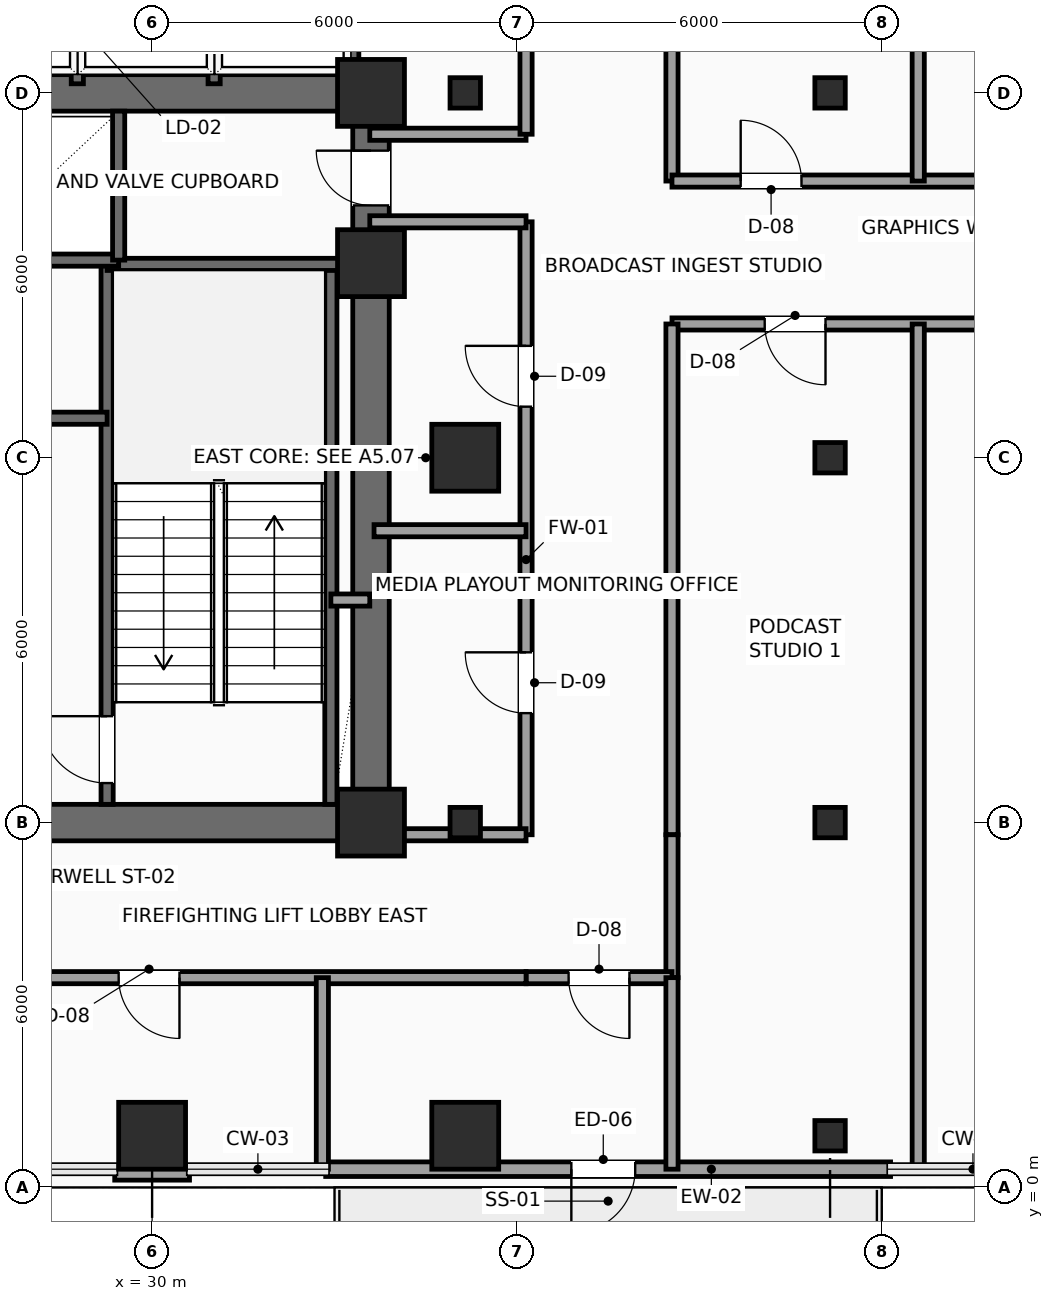
"""IFC4 building model, lengths in metres.
Left out: names, types, materials, properties, quantities, classifications, styles, units other than length and angle.
Written with IfcOpenShell. Run it as: python <this file> out.ifc"""

import sys

from ifc_helpers import new_model, si_unit, direction, frame, frame_2d, origin, origin_2d, place, context, subcontext, project, spatial, rectangle, hollow_rectangle, extrude, element, fill, save


model = new_model("IFC4")
c1 = context("Model", 3, precision=1e-05, world=origin(), true_north=direction((0.0, 1.0)))
c2 = subcontext(c1, "Body", "Model", "MODEL_VIEW")
j1 = project(units=[si_unit("LENGTHUNIT", "METRE"), si_unit("PLANEANGLEUNIT", "RADIAN")], contexts=[c1])
p1 = place(None, origin())
s1 = spatial("IfcSite", under=j1, at=p1, CompositionType="ELEMENT")
p2 = place(p1, origin())
s2 = spatial("IfcBuilding", under=s1, at=p2, CompositionType="ELEMENT")
p3 = place(p2, frame((0.0, 0.0, 119.4)))
s3 = spatial("IfcBuildingStorey", under=s2, at=p3, CompositionType="ELEMENT", Elevation=119.4)
for number, where, z_axis, x_axis in (
    (1, (33.6, 6.0, 0.0), (0.0, 0.0, 1.0), (1.0, 0.0, 0.0)),
    (2, (33.6, 15.2, 0.0), (0.0, 0.0, 1.0), (1.0, 0.0, 0.0)),
    (3, (33.6, 18.0, 0.0), (0.0, 0.0, 1.0), (1.0, 0.0, 0.0)),
    (4, (30.0, 0.85, 0.0), (0.0, 0.0, 1.0), (1.0, 0.0, 0.0)),
    (5, (35.15, 0.85, 0.0), (0.0, 0.0, 1.0), (1.0, 0.0, 0.0)),
):
    element("IfcColumn", number, at=place(p3, frame(where, z_axis=z_axis, x_axis=x_axis)), inside=s3, PredefinedType="COLUMN", context=c2, shape_type="SweptSolid", body=[
        extrude(rectangle(XDim=1.1, YDim=1.1, at=origin_2d()), origin(), (0.0, 0.0, 1.0), 3.75),
    ])
p4 = place(p3, frame((35.15, 6.0, 0.0), z_axis=(0.0, 0.0, 1.0), x_axis=(1.0, 0.0, 0.0)))
e6 = element("IfcColumn", 6, at=p4, inside=s3, PredefinedType="COLUMN", context=c2, shape_type="SweptSolid", body=[
    extrude(hollow_rectangle(XDim=0.5, YDim=0.5, WallThickness=0.025, InnerFilletRadius=0.025, OuterFilletRadius=0.04, at=origin_2d()), origin(), (0.0, 0.0, 1.0), 3.75),
])
p5 = place(p3, frame((35.15, 12.0, 0.0), z_axis=(0.0, 0.0, 1.0), x_axis=(1.0, 0.0, 0.0)))
e7 = element("IfcColumn", 7, at=p5, inside=s3, PredefinedType="COLUMN", context=c2, shape_type="SweptSolid", body=[
    extrude(rectangle(XDim=1.1, YDim=1.1, at=origin_2d()), origin(), (0.0, 0.0, 1.0), 3.75),
])
for number, where, z_axis, x_axis in (
    (8, (35.15, 18.0, 0.0), (0.0, 0.0, 1.0), (1.0, 0.0, 0.0)),
    (9, (41.15, 0.85, 0.0), (0.0, 0.0, 1.0), (1.0, 0.0, 0.0)),
    (10, (41.15, 6.0, 0.0), (0.0, 0.0, 1.0), (1.0, 0.0, 0.0)),
    (11, (41.15, 12.0, 0.0), (0.0, 0.0, 1.0), (1.0, 0.0, 0.0)),
    (12, (41.15, 18.0, 0.0), (0.0, 0.0, 1.0), (1.0, 0.0, 0.0)),
):
    element("IfcColumn", number, at=place(p3, frame(where, z_axis=z_axis, x_axis=x_axis)), inside=s3, PredefinedType="COLUMN", context=c2, shape_type="SweptSolid", body=[
        extrude(hollow_rectangle(XDim=0.5, YDim=0.5, WallThickness=0.025, InnerFilletRadius=0.025, OuterFilletRadius=0.04, at=origin_2d()), origin(), (0.0, 0.0, 1.0), 3.75),
    ])
p6 = place(p3, frame((42.145, 0.3, 0.0), z_axis=(0.0, 0.0, 1.0), x_axis=(-1.0, 0.0, 0.0)))
e13 = element("IfcWall", 13, at=p6, inside=s3, PredefinedType="SOLIDWALL", context=c2, shape_type="SweptSolid", body=[
    extrude(rectangle(XDim=9.29, YDim=0.24, at=frame_2d((4.645, 0.0))), origin(), (0.0, 0.0, 1.0), 3.525),
])
p7 = place(p6, frame((4.2, 0.0, 0.0)))
e14 = element("IfcOpeningElement", 14, at=p7, cuts=e13, PredefinedType="OPENING", context=c2, shape_type="SweptSolid", body=[
    extrude(rectangle(XDim=1.05, YDim=2.2, at=frame_2d((0.525, 1.1))), frame((0.0, 0.13, 0.0), z_axis=(0.0, -1.0, 0.0), x_axis=(1.0, 0.0, 0.0)), (0.0, 0.0, 1.0), 0.26),
])
p8 = place(p3, frame((30.615, 0.24, 0.0), z_axis=(0.0, 0.0, 1.0), x_axis=(-1.0, 0.0, 0.0)))
e15 = element("IfcWall", 15, at=p8, inside=s3, PredefinedType="SOLIDWALL", context=c2, shape_type="SweptSolid", body=[
    extrude(rectangle(XDim=1.23, YDim=0.24, at=frame_2d((0.615, 0.0))), origin(), (0.0, 0.0, 1.0), 3.525),
])
for number, where, z_axis, x_axis in (
    (16, (24.0, 6.0, 0.0), (0.0, 0.0, 1.0), (1.0, 0.0, 0.0)),
    (17, (24.0, 18.0, 0.0), (0.0, 0.0, 1.0), (1.0, 0.0, 0.0)),
):
    element("IfcWall", number, at=place(p3, frame(where, z_axis=z_axis, x_axis=x_axis)), inside=s3, PredefinedType="SHEAR", context=c2, shape_type="SweptSolid", body=[
        extrude(rectangle(XDim=9.6, YDim=0.6, at=frame_2d((4.8, 0.0))), origin(), (0.0, 0.0, 1.0), 3.525),
    ])
p9 = place(p3, frame((33.6, 6.0, 0.0), z_axis=(0.0, 0.0, 1.0), x_axis=(0.0, 1.0, 0.0)))
e18 = element("IfcWall", 18, at=p9, inside=s3, PredefinedType="SHEAR", context=c2, shape_type="SweptSolid", body=[
    extrude(rectangle(XDim=12.0, YDim=0.6, at=frame_2d((6.0, 0.0))), origin(), (0.0, 0.0, 1.0), 3.525),
])
p10 = place(p9, frame((10.15, 0.0, 0.0)))
e19 = element("IfcOpeningElement", 19, at=p10, cuts=e18, PredefinedType="OPENING", context=c2, shape_type="SweptSolid", body=[
    extrude(rectangle(XDim=0.9, YDim=2.15, at=frame_2d((0.45, 1.075))), frame((0.0, 0.31, 0.0), z_axis=(0.0, -1.0, 0.0), x_axis=(1.0, 0.0, 0.0)), (0.0, 0.0, 1.0), 0.62),
])
p11 = place(p3, frame((29.26, 6.3, 0.0), z_axis=(0.0, 0.0, 1.0), x_axis=(0.0, 1.0, 0.0)))
e20 = element("IfcWall", 20, at=p11, inside=s3, PredefinedType="SHEAR", context=c2, shape_type="SweptSolid", body=[
    extrude(rectangle(XDim=8.88, YDim=0.2, at=frame_2d((4.44, 0.0))), origin(), (0.0, 0.0, 1.0), 3.525),
])
p12 = place(p11, frame((0.35, 0.0, 0.0)))
e21 = element("IfcOpeningElement", 21, at=p12, cuts=e20, PredefinedType="OPENING", context=c2, shape_type="SweptSolid", body=[
    extrude(rectangle(XDim=1.1, YDim=2.2, at=frame_2d((0.55, 1.1))), frame((0.0, 0.11, 0.0), z_axis=(0.0, -1.0, 0.0), x_axis=(1.0, 0.0, 0.0)), (0.0, 0.0, 1.0), 0.22),
])
p13 = place(p3, frame((32.94, 6.3, 0.0), z_axis=(0.0, 0.0, 1.0), x_axis=(0.0, 1.0, 0.0)))
e22 = element("IfcWall", 22, at=p13, inside=s3, PredefinedType="SHEAR", context=c2, shape_type="SweptSolid", body=[
    extrude(rectangle(XDim=8.88, YDim=0.2, at=frame_2d((4.44, 0.0))), origin(), (0.0, 0.0, 1.0), 3.525),
])
p14 = place(p3, frame((29.26, 15.18, 0.0), z_axis=(0.0, 0.0, 1.0), x_axis=(1.0, 0.0, 0.0)))
e23 = element("IfcWall", 23, at=p14, inside=s3, PredefinedType="SHEAR", context=c2, shape_type="SweptSolid", body=[
    extrude(rectangle(XDim=4.04, YDim=0.2, at=frame_2d((2.02, 0.0))), origin(), (0.0, 0.0, 1.0), 3.525),
])
p15 = place(p3, frame((26.42, 12.65, 0.0), z_axis=(0.0, 0.0, 1.0), x_axis=(1.0, 0.0, 0.0)))
e24 = element("IfcWall", 24, at=p15, inside=s3, PredefinedType="SHEAR", context=c2, shape_type="SweptSolid", body=[
    extrude(rectangle(XDim=2.84, YDim=0.2, at=frame_2d((1.42, 0.0))), origin(), (0.0, 0.0, 1.0), 3.525),
])
p16 = place(p15, frame((0.9, 0.0, 0.0)))
e25 = element("IfcOpeningElement", 25, at=p16, cuts=e24, PredefinedType="OPENING", context=c2, shape_type="SweptSolid", body=[
    extrude(rectangle(XDim=0.9, YDim=2.15, at=frame_2d((0.45, 1.075))), frame((0.0, 0.11, 0.0), z_axis=(0.0, -1.0, 0.0), x_axis=(1.0, 0.0, 0.0)), (0.0, 0.0, 1.0), 0.22),
])
p17 = place(p3, frame((32.94, 9.66, 0.0), z_axis=(0.0, 0.0, 1.0), x_axis=(1.0, 0.0, 0.0)))
e26 = element("IfcWall", 26, at=p17, inside=s3, PredefinedType="SOLIDWALL", context=c2, shape_type="SweptSolid", body=[
    extrude(rectangle(XDim=0.64, YDim=0.2, at=frame_2d((0.32, 0.0))), origin(), (0.0, 0.0, 1.0), 3.525),
])
p18 = place(p3, frame((24.25, 15.25, 0.0), z_axis=(0.0, 0.0, 1.0), x_axis=(1.0, 0.0, 0.0)))
e27 = element("IfcWall", 27, at=p18, inside=s3, PredefinedType="SHEAR", context=c2, shape_type="SweptSolid", body=[
    extrude(rectangle(XDim=5.2, YDim=0.2, at=frame_2d((2.6, 0.0))), origin(), (0.0, 0.0, 1.0), 3.525),
])
p19 = place(p3, frame((29.45, 15.25, 0.0), z_axis=(0.0, 0.0, 1.0), x_axis=(0.0, 1.0, 0.0)))
e28 = element("IfcWall", 28, at=p19, inside=s3, PredefinedType="SHEAR", context=c2, shape_type="SweptSolid", body=[
    extrude(rectangle(XDim=2.45, YDim=0.2, at=frame_2d((1.225, 0.0))), origin(), (0.0, 0.0, 1.0), 3.525),
])
p20 = place(p3, frame((33.3, 18.1, 0.0), z_axis=(0.0, 0.0, 1.0), x_axis=(0.0, 1.0, 0.0)))
e29 = element("IfcWall", 29, at=p20, inside=s3, PredefinedType="SHEAR", context=c2, shape_type="SweptSolid", body=[
    extrude(rectangle(XDim=2.35, YDim=0.2, at=frame_2d((1.175, 0.0))), origin(), (0.0, 0.0, 1.0), 3.525),
])
for number, where, z_axis, x_axis in (
    (30, (28.77, 18.15, 0.0), (0.0, 0.0, 1.0), (0.0, 1.0, 0.0)),
    (31, (31.02, 18.15, 0.0), (0.0, 0.0, 1.0), (0.0, 1.0, 0.0)),
):
    element("IfcWall", number, at=place(p3, frame(where, z_axis=z_axis, x_axis=x_axis)), inside=s3, PredefinedType="SHEAR", context=c2, shape_type="SweptSolid", body=[
        extrude(rectangle(XDim=2.3, YDim=0.2, at=frame_2d((1.15, 0.0))), origin(), (0.0, 0.0, 1.0), 3.525),
    ])
p21 = place(p3, frame((36.15, 5.8, 0.0), z_axis=(0.0, 0.0, 1.0), x_axis=(0.0, 1.0, 0.0)))
e32 = element("IfcWall", 32, at=p21, inside=s3, PredefinedType="SOLIDWALL", context=c2, shape_type="SweptSolid", body=[
    extrude(rectangle(XDim=10.08, YDim=0.2, at=frame_2d((5.04, 0.0))), origin(), (0.0, 0.0, 1.0), 3.525),
])
p22 = place(p21, frame((2.0, 0.0, 0.0)))
e33 = element("IfcOpeningElement", 33, at=p22, cuts=e32, PredefinedType="OPENING", context=c2, shape_type="SweptSolid", body=[
    extrude(rectangle(XDim=1.0, YDim=2.2, at=frame_2d((0.5, 1.1))), frame((0.0, 0.11, 0.0), z_axis=(0.0, -1.0, 0.0), x_axis=(1.0, 0.0, 0.0)), (0.0, 0.0, 1.0), 0.22),
])
p23 = place(p21, frame((7.04, 0.0, 0.0)))
e34 = element("IfcOpeningElement", 34, at=p23, cuts=e32, PredefinedType="OPENING", context=c2, shape_type="SweptSolid", body=[
    extrude(rectangle(XDim=1.0, YDim=2.2, at=frame_2d((0.5, 1.1))), frame((0.0, 0.11, 0.0), z_axis=(0.0, -1.0, 0.0), x_axis=(1.0, 0.0, 0.0)), (0.0, 0.0, 1.0), 0.22),
])
for number, where, z_axis, x_axis in (
    (35, (36.15, 15.88, 0.0), (0.0, 0.0, 1.0), (-1.0, 0.0, 0.0)),
    (36, (33.58, 17.32, 0.0), (0.0, 0.0, 1.0), (1.0, 0.0, 0.0)),
):
    element("IfcWall", number, at=place(p3, frame(where, z_axis=z_axis, x_axis=x_axis)), inside=s3, PredefinedType="SOLIDWALL", context=c2, shape_type="SweptSolid", body=[
        extrude(rectangle(XDim=2.57, YDim=0.2, at=frame_2d((1.285, 0.0))), origin(), (0.0, 0.0, 1.0), 3.525),
    ])
p24 = place(p3, frame((36.15, 17.32, 0.0), z_axis=(0.0, 0.0, 1.0), x_axis=(0.0, 1.0, 0.0)))
e37 = element("IfcWall", 37, at=p24, inside=s3, PredefinedType="SOLIDWALL", context=c2, shape_type="SweptSolid", body=[
    extrude(rectangle(XDim=6.38, YDim=0.2, at=frame_2d((3.19, 0.0))), origin(), (0.0, 0.0, 1.0), 3.525),
])
p25 = place(p24, frame((2.68, 0.0, 0.0)))
e38 = element("IfcOpeningElement", 38, at=p25, cuts=e37, PredefinedType="OPENING", context=c2, shape_type="SweptSolid", body=[
    extrude(rectangle(XDim=1.0, YDim=2.2, at=frame_2d((0.5, 1.1))), frame((0.0, 0.11, 0.0), z_axis=(0.0, -1.0, 0.0), x_axis=(1.0, 0.0, 0.0)), (0.0, 0.0, 1.0), 0.22),
])
p26 = place(p3, frame((38.55, 23.7, 0.0), z_axis=(0.0, 0.0, 1.0), x_axis=(0.0, -1.0, 0.0)))
e39 = element("IfcWall", 39, at=p26, inside=s3, PredefinedType="SOLIDWALL", context=c2, shape_type="SweptSolid", body=[
    extrude(rectangle(XDim=7.15, YDim=0.2, at=frame_2d((3.575, 0.0))), origin(), (0.0, 0.0, 1.0), 3.525),
])
p27 = place(p3, frame((38.55, 16.55, 0.0), z_axis=(0.0, 0.0, 1.0), x_axis=(1.0, 0.0, 0.0)))
e40 = element("IfcWall", 40, at=p27, inside=s3, PredefinedType="SOLIDWALL", context=c2, shape_type="SweptSolid", body=[
    extrude(rectangle(XDim=9.15, YDim=0.2, at=frame_2d((4.575, 0.0))), origin(), (0.0, 0.0, 1.0), 3.525),
])
p28 = place(p27, frame((1.13, 0.0, 0.0)))
e41 = element("IfcOpeningElement", 41, at=p28, cuts=e40, PredefinedType="OPENING", context=c2, shape_type="SweptSolid", body=[
    extrude(rectangle(XDim=1.0, YDim=2.2, at=frame_2d((0.5, 1.1))), frame((0.0, 0.11, 0.0), z_axis=(0.0, -1.0, 0.0), x_axis=(1.0, 0.0, 0.0)), (0.0, 0.0, 1.0), 0.22),
])
p29 = place(p27, frame((6.075, 0.0, 0.0)))
e42 = element("IfcOpeningElement", 42, at=p29, cuts=e40, PredefinedType="OPENING", context=c2, shape_type="SweptSolid", body=[
    extrude(rectangle(XDim=1.0, YDim=2.2, at=frame_2d((0.5, 1.1))), frame((0.0, 0.11, 0.0), z_axis=(0.0, -1.0, 0.0), x_axis=(1.0, 0.0, 0.0)), (0.0, 0.0, 1.0), 0.22),
])
p30 = place(p3, frame((47.7, 14.2, 0.0), z_axis=(0.0, 0.0, 1.0), x_axis=(-1.0, 0.0, 0.0)))
e43 = element("IfcWall", 43, at=p30, inside=s3, PredefinedType="SOLIDWALL", context=c2, shape_type="SweptSolid", body=[
    extrude(rectangle(XDim=9.15, YDim=0.2, at=frame_2d((4.575, 0.0))), origin(), (0.0, 0.0, 1.0), 3.525),
])
p31 = place(p30, frame((6.625, 0.0, 0.0)))
e44 = element("IfcOpeningElement", 44, at=p31, cuts=e43, PredefinedType="OPENING", context=c2, shape_type="SweptSolid", body=[
    extrude(rectangle(XDim=1.0, YDim=2.2, at=frame_2d((0.5, 1.1))), frame((0.0, 0.11, 0.0), z_axis=(0.0, -1.0, 0.0), x_axis=(1.0, 0.0, 0.0)), (0.0, 0.0, 1.0), 0.22),
])
p32 = place(p30, frame((2.075, 0.0, 0.0)))
e45 = element("IfcOpeningElement", 45, at=p32, cuts=e43, PredefinedType="OPENING", context=c2, shape_type="SweptSolid", body=[
    extrude(rectangle(XDim=1.0, YDim=2.2, at=frame_2d((0.5, 1.1))), frame((0.0, 0.11, 0.0), z_axis=(0.0, -1.0, 0.0), x_axis=(1.0, 0.0, 0.0)), (0.0, 0.0, 1.0), 0.22),
])
p33 = place(p3, frame((38.55, 14.2, 0.0), z_axis=(0.0, 0.0, 1.0), x_axis=(0.0, -1.0, 0.0)))
e46 = element("IfcWall", 46, at=p33, inside=s3, PredefinedType="SOLIDWALL", context=c2, shape_type="SweptSolid", body=[
    extrude(rectangle(XDim=8.4, YDim=0.2, at=frame_2d((4.2, 0.0))), origin(), (0.0, 0.0, 1.0), 3.525),
])
p34 = place(p3, frame((38.55, 5.8, 0.0), z_axis=(0.0, 0.0, 1.0), x_axis=(0.0, -1.0, 0.0)))
e47 = element("IfcWall", 47, at=p34, inside=s3, PredefinedType="SOLIDWALL", context=c2, shape_type="SweptSolid", body=[
    extrude(rectangle(XDim=2.35, YDim=0.2, at=frame_2d((1.175, 0.0))), origin(), (0.0, 0.0, 1.0), 3.525),
])
p35 = place(p3, frame((38.55, 3.45, 0.0), z_axis=(0.0, 0.0, 1.0), x_axis=(-1.0, 0.0, 0.0)))
e48 = element("IfcWall", 48, at=p35, inside=s3, PredefinedType="SOLIDWALL", context=c2, shape_type="SweptSolid", body=[
    extrude(rectangle(XDim=2.4, YDim=0.2, at=frame_2d((1.2, 0.0))), origin(), (0.0, 0.0, 1.0), 3.067),
])
p36 = place(p35, frame((0.7, 0.0, 0.0)))
e49 = element("IfcOpeningElement", 49, at=p36, cuts=e48, PredefinedType="OPENING", context=c2, shape_type="SweptSolid", body=[
    extrude(rectangle(XDim=1.0, YDim=2.2, at=frame_2d((0.5, 1.1))), frame((0.0, 0.11, 0.0), z_axis=(0.0, -1.0, 0.0), x_axis=(1.0, 0.0, 0.0)), (0.0, 0.0, 1.0), 0.22),
])
p37 = place(p3, frame((36.15, 3.45, 0.0), z_axis=(0.0, 0.0, 1.0), x_axis=(-1.0, 0.0, 0.0)))
e50 = element("IfcWall", 50, at=p37, inside=s3, PredefinedType="SOLIDWALL", context=c2, shape_type="SweptSolid", body=[
    extrude(rectangle(XDim=12.2, YDim=0.2, at=frame_2d((6.1, 0.0))), origin(), (0.0, 0.0, 1.0), 3.067),
])
p38 = place(p37, frame((10.125, 0.0, 0.0)))
e51 = element("IfcOpeningElement", 51, at=p38, cuts=e50, PredefinedType="OPENING", context=c2, shape_type="SweptSolid", body=[
    extrude(rectangle(XDim=1.0, YDim=2.2, at=frame_2d((0.5, 1.1))), frame((0.0, 0.11, 0.0), z_axis=(0.0, -1.0, 0.0), x_axis=(1.0, 0.0, 0.0)), (0.0, 0.0, 1.0), 0.22),
])
p39 = place(p37, frame((5.7, 0.0, 0.0)))
e52 = element("IfcOpeningElement", 52, at=p39, cuts=e50, PredefinedType="OPENING", context=c2, shape_type="SweptSolid", body=[
    extrude(rectangle(XDim=1.0, YDim=2.2, at=frame_2d((0.5, 1.1))), frame((0.0, 0.11, 0.0), z_axis=(0.0, -1.0, 0.0), x_axis=(1.0, 0.0, 0.0)), (0.0, 0.0, 1.0), 0.22),
])
for number, where, z_axis, x_axis in (
    (53, (32.8, 0.3, 0.0), (0.0, 0.0, 1.0), (0.0, 1.0, 0.0)),
    (54, (38.55, 0.3, 0.0), (0.0, 0.0, 1.0), (0.0, 1.0, 0.0)),
):
    element("IfcWall", number, at=place(p3, frame(where, z_axis=z_axis, x_axis=x_axis)), inside=s3, PredefinedType="PARTITIONING", context=c2, shape_type="SweptSolid", body=[
        extrude(rectangle(XDim=3.15, YDim=0.2, at=frame_2d((1.575, 0.0))), origin(), (0.0, 0.0, 1.0), 3.525),
    ])
p40 = place(p3, frame((33.65, 5.8, 0.0), z_axis=(0.0, 0.0, 1.0), x_axis=(1.0, 0.0, 0.0)))
e55 = element("IfcWall", 55, at=p40, inside=s3, PredefinedType="PARTITIONING", context=c2, shape_type="SweptSolid", body=[
    extrude(rectangle(XDim=2.5, YDim=0.2, at=frame_2d((1.25, 0.0))), origin(), (0.0, 0.0, 1.0), 3.017),
])
p41 = place(p3, frame((33.65, 10.8, 0.0), z_axis=(0.0, 0.0, 1.0), x_axis=(1.0, 0.0, 0.0)))
e56 = element("IfcWall", 56, at=p41, inside=s3, PredefinedType="PARTITIONING", context=c2, shape_type="SweptSolid", body=[
    extrude(rectangle(XDim=2.5, YDim=0.2, at=frame_2d((1.25, 0.0))), origin(), (0.0, 0.0, 1.0), 3.525),
])
p42 = place(p3, frame((42.6, 0.3, 0.0), z_axis=(0.0, 0.0, 1.0), x_axis=(0.0, 1.0, 0.0)))
e57 = element("IfcWall", 57, at=p42, inside=s3, PredefinedType="PARTITIONING", context=c2, shape_type="SweptSolid", body=[
    extrude(rectangle(XDim=13.9, YDim=0.2, at=frame_2d((6.95, 0.0))), origin(), (0.0, 0.0, 1.0), 3.525),
])
p43 = place(p3, frame((42.6, 16.55, 0.0), z_axis=(0.0, 0.0, 1.0), x_axis=(0.0, 1.0, 0.0)))
e58 = element("IfcWall", 58, at=p43, inside=s3, PredefinedType="PARTITIONING", context=c2, shape_type="SweptSolid", body=[
    extrude(rectangle(XDim=7.15, YDim=0.2, at=frame_2d((3.575, 0.0))), origin(), (0.0, 0.0, 1.0), 3.525),
])
p44 = place(p7, origin())
e59 = element("IfcDoor", 59, at=p44, inside=s3, OperationType="SINGLE_SWING_RIGHT", PredefinedType="DOOR", context=c2, shape_type="SweptSolid", body=[
    extrude(rectangle(XDim=1.05, YDim=2.2, at=frame_2d((0.525, 1.1))), frame((0.0, 0.025, 0.0), z_axis=(0.0, -1.0, 0.0), x_axis=(1.0, 0.0, 0.0)), (0.0, 0.0, 1.0), 0.05),
])
fill(e14, e59)
p45 = place(p10, origin())
e60 = element("IfcDoor", 60, at=p45, inside=s3, OperationType="SINGLE_SWING_RIGHT", PredefinedType="DOOR", context=c2, shape_type="SweptSolid", body=[
    extrude(rectangle(XDim=0.9, YDim=2.15, at=frame_2d((0.45, 1.075))), frame((0.0, 0.025, 0.0), z_axis=(0.0, -1.0, 0.0), x_axis=(1.0, 0.0, 0.0)), (0.0, 0.0, 1.0), 0.05),
])
fill(e19, e60)
p46 = place(p12, origin())
e61 = element("IfcDoor", 61, at=p46, inside=s3, OperationType="SINGLE_SWING_RIGHT", PredefinedType="DOOR", context=c2, shape_type="SweptSolid", body=[
    extrude(rectangle(XDim=1.1, YDim=2.2, at=frame_2d((0.55, 1.1))), frame((0.0, 0.025, 0.0), z_axis=(0.0, -1.0, 0.0), x_axis=(1.0, 0.0, 0.0)), (0.0, 0.0, 1.0), 0.05),
])
fill(e21, e61)
p47 = place(p22, origin())
e62 = element("IfcDoor", 62, at=p47, inside=s3, OperationType="SINGLE_SWING_RIGHT", PredefinedType="DOOR", context=c2, shape_type="SweptSolid", body=[
    extrude(rectangle(XDim=1.0, YDim=2.2, at=frame_2d((0.5, 1.1))), frame((0.0, 0.025, 0.0), z_axis=(0.0, -1.0, 0.0), x_axis=(1.0, 0.0, 0.0)), (0.0, 0.0, 1.0), 0.05),
])
fill(e33, e62)
p48 = place(p23, origin())
e63 = element("IfcDoor", 63, at=p48, inside=s3, OperationType="SINGLE_SWING_RIGHT", PredefinedType="DOOR", context=c2, shape_type="SweptSolid", body=[
    extrude(rectangle(XDim=1.0, YDim=2.2, at=frame_2d((0.5, 1.1))), frame((0.0, 0.025, 0.0), z_axis=(0.0, -1.0, 0.0), x_axis=(1.0, 0.0, 0.0)), (0.0, 0.0, 1.0), 0.05),
])
fill(e34, e63)
p49 = place(p28, origin())
e64 = element("IfcDoor", 64, at=p49, inside=s3, OperationType="SINGLE_SWING_LEFT", PredefinedType="DOOR", context=c2, shape_type="SweptSolid", body=[
    extrude(rectangle(XDim=1.0, YDim=2.2, at=frame_2d((0.5, 1.1))), frame((0.0, 0.025, 0.0), z_axis=(0.0, -1.0, 0.0), x_axis=(1.0, 0.0, 0.0)), (0.0, 0.0, 1.0), 0.05),
])
fill(e41, e64)
p50 = place(p31, origin())
e65 = element("IfcDoor", 65, at=p50, inside=s3, OperationType="SINGLE_SWING_LEFT", PredefinedType="DOOR", context=c2, shape_type="SweptSolid", body=[
    extrude(rectangle(XDim=1.0, YDim=2.2, at=frame_2d((0.5, 1.1))), frame((0.0, 0.025, 0.0), z_axis=(0.0, -1.0, 0.0), x_axis=(1.0, 0.0, 0.0)), (0.0, 0.0, 1.0), 0.05),
])
fill(e44, e65)
p51 = place(p36, origin())
e66 = element("IfcDoor", 66, at=p51, inside=s3, OperationType="SINGLE_SWING_LEFT", PredefinedType="DOOR", context=c2, shape_type="SweptSolid", body=[
    extrude(rectangle(XDim=1.0, YDim=2.2, at=frame_2d((0.5, 1.1))), frame((0.0, 0.025, 0.0), z_axis=(0.0, -1.0, 0.0), x_axis=(1.0, 0.0, 0.0)), (0.0, 0.0, 1.0), 0.05),
])
fill(e49, e66)
p52 = place(p39, origin())
e67 = element("IfcDoor", 67, at=p52, inside=s3, OperationType="SINGLE_SWING_LEFT", PredefinedType="DOOR", context=c2, shape_type="SweptSolid", body=[
    extrude(rectangle(XDim=1.0, YDim=2.2, at=frame_2d((0.5, 1.1))), frame((0.0, 0.025, 0.0), z_axis=(0.0, -1.0, 0.0), x_axis=(1.0, 0.0, 0.0)), (0.0, 0.0, 1.0), 0.05),
])
fill(e52, e67)
save(model, sys.argv[1])
